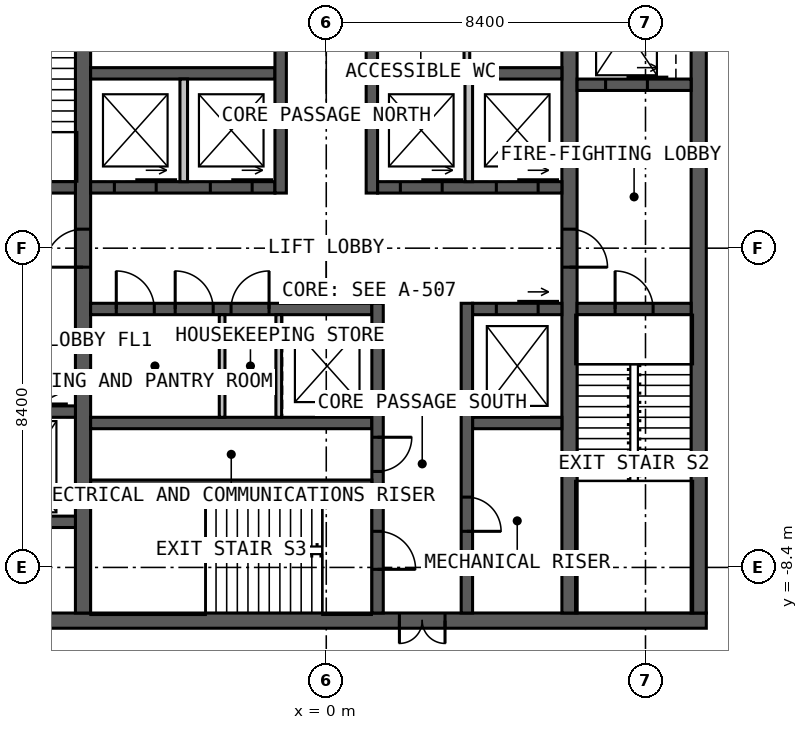
"""IFC4 building model, lengths in metres.
Left out: names, types, materials, properties, quantities, classifications, styles, units other than length and angle.
Written with IfcOpenShell. Run it as: python <this file> out.ifc"""

import sys

from ifc_helpers import new_model, si_unit, direction, frame, frame_2d, origin, place, context, subcontext, project, spatial, rectangle, extrude, element, fill, save


model = new_model("IFC4")
c1 = context("Model", 3, precision=1e-05, world=origin(), true_north=direction((0.0, 1.0)))
c2 = subcontext(c1, "Body", "Model", "MODEL_VIEW")
j1 = project(units=[si_unit("LENGTHUNIT", "METRE"), si_unit("PLANEANGLEUNIT", "RADIAN")], contexts=[c1])
p1 = place(None, origin())
s1 = spatial("IfcSite", under=j1, at=p1, CompositionType="ELEMENT")
p2 = place(p1, origin())
s2 = spatial("IfcBuilding", under=s1, at=p2, CompositionType="ELEMENT")
p3 = place(p2, frame((0.0, 0.0, 276.0)))
s3 = spatial("IfcBuildingStorey", under=s2, at=p3, CompositionType="ELEMENT", Elevation=276.0)
p4 = place(p3, frame((10.0, -9.8, 0.0), z_axis=(0.0, 0.0, 1.0), x_axis=(-1.0, 0.0, 0.0)))
e1 = element("IfcWall", 1, at=p4, inside=s3, PredefinedType="SOLIDWALL", context=c2, shape_type="SweptSolid", body=[
    extrude(rectangle(XDim=20.0, YDim=0.4, at=frame_2d((10.0, 0.0))), origin(), (0.0, 0.0, 1.0), 4.0),
])
p5 = place(p4, frame((6.875, 0.0, 0.0)))
e2 = element("IfcOpeningElement", 2, at=p5, cuts=e1, PredefinedType="OPENING", context=c2, shape_type="SweptSolid", body=[
    extrude(rectangle(XDim=1.2, YDim=2.2, at=frame_2d((0.6, 1.1))), frame((0.0, 0.21, 0.0), z_axis=(0.0, -1.0, 0.0), x_axis=(1.0, 0.0, 0.0)), (0.0, 0.0, 1.0), 0.42),
])
p6 = place(p3, frame((9.8, -9.6, 0.0), z_axis=(0.0, 0.0, 1.0), x_axis=(0.0, 1.0, 0.0)))
e3 = element("IfcWall", 3, at=p6, inside=s3, PredefinedType="SOLIDWALL", context=c2, shape_type="SweptSolid", body=[
    extrude(rectangle(XDim=19.2, YDim=0.4, at=frame_2d((9.6, 0.0))), origin(), (0.0, 0.0, 1.0), 4.0),
])
p7 = place(p3, frame((-6.4, -9.6, 0.0), z_axis=(0.0, 0.0, 1.0), x_axis=(0.0, 1.0, 0.0)))
e4 = element("IfcWall", 4, at=p7, inside=s3, PredefinedType="SOLIDWALL", context=c2, shape_type="SweptSolid", body=[
    extrude(rectangle(XDim=19.2, YDim=0.4, at=frame_2d((9.6, 0.0))), origin(), (0.0, 0.0, 1.0), 4.0),
])
p8 = place(p7, frame((9.1, 0.0, 0.0)))
e5 = element("IfcOpeningElement", 5, at=p8, cuts=e4, PredefinedType="OPENING", context=c2, shape_type="SweptSolid", body=[
    extrude(rectangle(XDim=1.0, YDim=2.2, at=frame_2d((0.5, 1.1))), frame((0.0, 0.21, 0.0), z_axis=(0.0, -1.0, 0.0), x_axis=(1.0, 0.0, 0.0)), (0.0, 0.0, 1.0), 0.42),
])
p9 = place(p3, frame((6.4, 9.6, 0.0), z_axis=(0.0, 0.0, 1.0), x_axis=(0.0, -1.0, 0.0)))
e6 = element("IfcWall", 6, at=p9, inside=s3, PredefinedType="SOLIDWALL", context=c2, shape_type="SweptSolid", body=[
    extrude(rectangle(XDim=19.2, YDim=0.4, at=frame_2d((9.6, 0.0))), origin(), (0.0, 0.0, 1.0), 4.0),
])
p10 = place(p9, frame((9.1, 0.0, 0.0)))
e7 = element("IfcOpeningElement", 7, at=p10, cuts=e6, PredefinedType="OPENING", context=c2, shape_type="SweptSolid", body=[
    extrude(rectangle(XDim=1.0, YDim=2.2, at=frame_2d((0.5, 1.1))), frame((0.0, 0.21, 0.0), z_axis=(0.0, -1.0, 0.0), x_axis=(1.0, 0.0, 0.0)), (0.0, 0.0, 1.0), 0.42),
])
p11 = place(p3, frame((-6.2, 1.6, 0.0), z_axis=(0.0, 0.0, 1.0), x_axis=(1.0, 0.0, 0.0)))
e8 = element("IfcWall", 8, at=p11, inside=s3, PredefinedType="SOLIDWALL", context=c2, shape_type="SweptSolid", body=[
    extrude(rectangle(XDim=4.85, YDim=0.3, at=frame_2d((2.425, 0.0))), origin(), (0.0, 0.0, 1.0), 4.0),
])
p12 = place(p11, frame((0.625, 0.0, 0.0)))
e9 = element("IfcOpeningElement", 9, at=p12, cuts=e8, PredefinedType="OPENING", context=c2, shape_type="SweptSolid", body=[
    extrude(rectangle(XDim=1.1, YDim=2.2, at=frame_2d((0.55, 1.1))), frame((0.0, 0.16, 0.0), z_axis=(0.0, -1.0, 0.0), x_axis=(1.0, 0.0, 0.0)), (0.0, 0.0, 1.0), 0.32),
])
p13 = place(p11, frame((3.15, 0.0, 0.0)))
e10 = element("IfcOpeningElement", 10, at=p13, cuts=e8, PredefinedType="OPENING", context=c2, shape_type="SweptSolid", body=[
    extrude(rectangle(XDim=1.1, YDim=2.2, at=frame_2d((0.55, 1.1))), frame((0.0, 0.16, 0.0), z_axis=(0.0, -1.0, 0.0), x_axis=(1.0, 0.0, 0.0)), (0.0, 0.0, 1.0), 0.32),
])
p14 = place(p3, frame((1.35, 1.6, 0.0), z_axis=(0.0, 0.0, 1.0), x_axis=(1.0, 0.0, 0.0)))
e11 = element("IfcWall", 11, at=p14, inside=s3, PredefinedType="SOLIDWALL", context=c2, shape_type="SweptSolid", body=[
    extrude(rectangle(XDim=4.85, YDim=0.3, at=frame_2d((2.425, 0.0))), origin(), (0.0, 0.0, 1.0), 4.0),
])
p15 = place(p14, frame((0.6, 0.0, 0.0)))
e12 = element("IfcOpeningElement", 12, at=p15, cuts=e11, PredefinedType="OPENING", context=c2, shape_type="SweptSolid", body=[
    extrude(rectangle(XDim=1.1, YDim=2.2, at=frame_2d((0.55, 1.1))), frame((0.0, 0.16, 0.0), z_axis=(0.0, -1.0, 0.0), x_axis=(1.0, 0.0, 0.0)), (0.0, 0.0, 1.0), 0.32),
])
p16 = place(p14, frame((3.125, 0.0, 0.0)))
e13 = element("IfcOpeningElement", 13, at=p16, cuts=e11, PredefinedType="OPENING", context=c2, shape_type="SweptSolid", body=[
    extrude(rectangle(XDim=1.1, YDim=2.2, at=frame_2d((0.55, 1.1))), frame((0.0, 0.16, 0.0), z_axis=(0.0, -1.0, 0.0), x_axis=(1.0, 0.0, 0.0)), (0.0, 0.0, 1.0), 0.32),
])
for number, where, z_axis, x_axis in (
    (14, (-6.2, 4.6, 0.0), (0.0, 0.0, 1.0), (1.0, 0.0, 0.0)),
    (15, (1.35, 4.6, 0.0), (0.0, 0.0, 1.0), (1.0, 0.0, 0.0)),
):
    element("IfcWall", number, at=place(p3, frame(where, z_axis=z_axis, x_axis=x_axis)), inside=s3, PredefinedType="SOLIDWALL", context=c2, shape_type="SweptSolid", body=[
        extrude(rectangle(XDim=4.85, YDim=0.3, at=frame_2d((2.425, 0.0))), origin(), (0.0, 0.0, 1.0), 4.0),
    ])
p17 = place(p3, frame((-1.2, 1.45, 0.0), z_axis=(0.0, 0.0, 1.0), x_axis=(0.0, 1.0, 0.0)))
e16 = element("IfcWall", 16, at=p17, inside=s3, PredefinedType="SOLIDWALL", context=c2, shape_type="SweptSolid", body=[
    extrude(rectangle(XDim=8.15, YDim=0.3, at=frame_2d((4.075, 0.0))), origin(), (0.0, 0.0, 1.0), 4.0),
])
p18 = place(p17, frame((5.05, 0.0, 0.0)))
e17 = element("IfcOpeningElement", 17, at=p18, cuts=e16, PredefinedType="OPENING", context=c2, shape_type="SweptSolid", body=[
    extrude(rectangle(XDim=1.0, YDim=2.2, at=frame_2d((0.5, 1.1))), frame((0.0, 0.16, 0.0), z_axis=(0.0, -1.0, 0.0), x_axis=(1.0, 0.0, 0.0)), (0.0, 0.0, 1.0), 0.32),
])
p19 = place(p3, frame((1.2, 1.45, 0.0), z_axis=(0.0, 0.0, 1.0), x_axis=(0.0, 1.0, 0.0)))
e18 = element("IfcWall", 18, at=p19, inside=s3, PredefinedType="SOLIDWALL", context=c2, shape_type="SweptSolid", body=[
    extrude(rectangle(XDim=8.15, YDim=0.3, at=frame_2d((4.075, 0.0))), origin(), (0.0, 0.0, 1.0), 4.0),
])
p20 = place(p19, frame((3.8, 0.0, 0.0)))
e19 = element("IfcOpeningElement", 19, at=p20, cuts=e18, PredefinedType="OPENING", context=c2, shape_type="SweptSolid", body=[
    extrude(rectangle(XDim=1.0, YDim=2.2, at=frame_2d((0.5, 1.1))), frame((0.0, 0.16, 0.0), z_axis=(0.0, -1.0, 0.0), x_axis=(1.0, 0.0, 0.0)), (0.0, 0.0, 1.0), 0.32),
])
p21 = place(p19, frame((6.15, 0.0, 0.0)))
e20 = element("IfcOpeningElement", 20, at=p21, cuts=e18, PredefinedType="OPENING", context=c2, shape_type="SweptSolid", body=[
    extrude(rectangle(XDim=1.0, YDim=2.2, at=frame_2d((0.5, 1.1))), frame((0.0, 0.16, 0.0), z_axis=(0.0, -1.0, 0.0), x_axis=(1.0, 0.0, 0.0)), (0.0, 0.0, 1.0), 0.32),
])
p22 = place(p3, frame((-6.2, -1.6, 0.0), z_axis=(0.0, 0.0, 1.0), x_axis=(1.0, 0.0, 0.0)))
e21 = element("IfcWall", 21, at=p22, inside=s3, PredefinedType="SOLIDWALL", context=c2, shape_type="SweptSolid", body=[
    extrude(rectangle(XDim=7.4, YDim=0.3, at=frame_2d((3.7, 0.0))), origin(), (0.0, 0.0, 1.0), 4.0),
])
p23 = place(p22, frame((0.675, 0.0, 0.0)))
e22 = element("IfcOpeningElement", 22, at=p23, cuts=e21, PredefinedType="OPENING", context=c2, shape_type="SweptSolid", body=[
    extrude(rectangle(XDim=1.0, YDim=2.2, at=frame_2d((0.5, 1.1))), frame((0.0, 0.16, 0.0), z_axis=(0.0, -1.0, 0.0), x_axis=(1.0, 0.0, 0.0)), (0.0, 0.0, 1.0), 0.32),
])
p24 = place(p22, frame((2.225, 0.0, 0.0)))
e23 = element("IfcOpeningElement", 23, at=p24, cuts=e21, PredefinedType="OPENING", context=c2, shape_type="SweptSolid", body=[
    extrude(rectangle(XDim=1.0, YDim=2.2, at=frame_2d((0.5, 1.1))), frame((0.0, 0.16, 0.0), z_axis=(0.0, -1.0, 0.0), x_axis=(1.0, 0.0, 0.0)), (0.0, 0.0, 1.0), 0.32),
])
p25 = place(p22, frame((3.695, 0.0, 0.0)))
e24 = element("IfcOpeningElement", 24, at=p25, cuts=e21, PredefinedType="OPENING", context=c2, shape_type="SweptSolid", body=[
    extrude(rectangle(XDim=1.0, YDim=2.2, at=frame_2d((0.5, 1.1))), frame((0.0, 0.16, 0.0), z_axis=(0.0, -1.0, 0.0), x_axis=(1.0, 0.0, 0.0)), (0.0, 0.0, 1.0), 0.32),
])
p26 = place(p3, frame((3.85, -1.6, 0.0), z_axis=(0.0, 0.0, 1.0), x_axis=(1.0, 0.0, 0.0)))
e25 = element("IfcWall", 25, at=p26, inside=s3, PredefinedType="SOLIDWALL", context=c2, shape_type="SweptSolid", body=[
    extrude(rectangle(XDim=2.35, YDim=0.3, at=frame_2d((1.175, 0.0))), origin(), (0.0, 0.0, 1.0), 4.0),
])
p27 = place(p26, frame((0.625, 0.0, 0.0)))
e26 = element("IfcOpeningElement", 26, at=p27, cuts=e25, PredefinedType="OPENING", context=c2, shape_type="SweptSolid", body=[
    extrude(rectangle(XDim=1.1, YDim=2.2, at=frame_2d((0.55, 1.1))), frame((0.0, 0.16, 0.0), z_axis=(0.0, -1.0, 0.0), x_axis=(1.0, 0.0, 0.0)), (0.0, 0.0, 1.0), 0.32),
])
p28 = place(p3, frame((-6.2, -4.6, 0.0), z_axis=(0.0, 0.0, 1.0), x_axis=(1.0, 0.0, 0.0)))
e27 = element("IfcWall", 27, at=p28, inside=s3, PredefinedType="SOLIDWALL", context=c2, shape_type="SweptSolid", body=[
    extrude(rectangle(XDim=7.4, YDim=0.3, at=frame_2d((3.7, 0.0))), origin(), (0.0, 0.0, 1.0), 4.0),
])
p29 = place(p3, frame((3.85, -4.6, 0.0), z_axis=(0.0, 0.0, 1.0), x_axis=(1.0, 0.0, 0.0)))
e28 = element("IfcWall", 28, at=p29, inside=s3, PredefinedType="SOLIDWALL", context=c2, shape_type="SweptSolid", body=[
    extrude(rectangle(XDim=2.35, YDim=0.3, at=frame_2d((1.175, 0.0))), origin(), (0.0, 0.0, 1.0), 4.0),
])
p30 = place(p3, frame((1.35, -1.45, 0.0), z_axis=(0.0, 0.0, 1.0), x_axis=(0.0, -1.0, 0.0)))
e29 = element("IfcWall", 29, at=p30, inside=s3, PredefinedType="SOLIDWALL", context=c2, shape_type="SweptSolid", body=[
    extrude(rectangle(XDim=8.15, YDim=0.3, at=frame_2d((4.075, 0.0))), origin(), (0.0, 0.0, 1.0), 4.0),
])
p31 = place(p30, frame((6.0, 0.0, 0.0)))
e30 = element("IfcOpeningElement", 30, at=p31, cuts=e29, PredefinedType="OPENING", context=c2, shape_type="SweptSolid", body=[
    extrude(rectangle(XDim=1.0, YDim=2.2, at=frame_2d((0.5, 1.1))), frame((0.0, 0.16, 0.0), z_axis=(0.0, -1.0, 0.0), x_axis=(1.0, 0.0, 0.0)), (0.0, 0.0, 1.0), 0.32),
])
p32 = place(p30, frame((3.525, 0.0, 0.0)))
e31 = element("IfcOpeningElement", 31, at=p32, cuts=e29, PredefinedType="OPENING", context=c2, shape_type="SweptSolid", body=[
    extrude(rectangle(XDim=0.9, YDim=2.2, at=frame_2d((0.45, 1.1))), frame((0.0, 0.16, 0.0), z_axis=(0.0, -1.0, 0.0), x_axis=(1.0, 0.0, 0.0)), (0.0, 0.0, 1.0), 0.32),
])
p33 = place(p3, frame((3.7, -1.45, 0.0), z_axis=(0.0, 0.0, 1.0), x_axis=(0.0, -1.0, 0.0)))
e32 = element("IfcWall", 32, at=p33, inside=s3, PredefinedType="SOLIDWALL", context=c2, shape_type="SweptSolid", body=[
    extrude(rectangle(XDim=8.15, YDim=0.3, at=frame_2d((4.075, 0.0))), origin(), (0.0, 0.0, 1.0), 4.0),
])
p34 = place(p33, frame((5.1, 0.0, 0.0)))
e33 = element("IfcOpeningElement", 33, at=p34, cuts=e32, PredefinedType="OPENING", context=c2, shape_type="SweptSolid", body=[
    extrude(rectangle(XDim=0.9, YDim=2.2, at=frame_2d((0.45, 1.1))), frame((0.0, 0.16, 0.0), z_axis=(0.0, -1.0, 0.0), x_axis=(1.0, 0.0, 0.0)), (0.0, 0.0, 1.0), 0.32),
])
p35 = place(p3, frame((-6.2, -6.2, 0.0), z_axis=(0.0, 0.0, 1.0), x_axis=(1.0, 0.0, 0.0)))
e34 = element("IfcWall", 34, at=p35, inside=s3, PredefinedType="SOLIDWALL", context=c2, shape_type="SweptSolid", body=[
    extrude(rectangle(XDim=7.4, YDim=0.2, at=frame_2d((3.7, 0.0))), origin(), (0.0, 0.0, 1.0), 4.0),
])
p36 = place(p3, frame((-9.6, 1.6, 0.0), z_axis=(0.0, 0.0, 1.0), x_axis=(1.0, 0.0, 0.0)))
e35 = element("IfcWall", 35, at=p36, inside=s3, PredefinedType="SOLIDWALL", context=c2, shape_type="SweptSolid", body=[
    extrude(rectangle(XDim=3.0, YDim=0.3, at=frame_2d((1.5, 0.0))), origin(), (0.0, 0.0, 1.0), 4.0),
])
p37 = place(p36, frame((1.0, 0.0, 0.0)))
e36 = element("IfcOpeningElement", 36, at=p37, cuts=e35, PredefinedType="OPENING", context=c2, shape_type="SweptSolid", body=[
    extrude(rectangle(XDim=1.0, YDim=2.2, at=frame_2d((0.5, 1.1))), frame((0.0, 0.16, 0.0), z_axis=(0.0, -1.0, 0.0), x_axis=(1.0, 0.0, 0.0)), (0.0, 0.0, 1.0), 0.32),
])
p38 = place(p3, frame((6.6, -1.6, 0.0), z_axis=(0.0, 0.0, 1.0), x_axis=(1.0, 0.0, 0.0)))
e37 = element("IfcWall", 37, at=p38, inside=s3, PredefinedType="SOLIDWALL", context=c2, shape_type="SweptSolid", body=[
    extrude(rectangle(XDim=3.0, YDim=0.3, at=frame_2d((1.5, 0.0))), origin(), (0.0, 0.0, 1.0), 4.0),
])
p39 = place(p38, frame((1.0, 0.0, 0.0)))
e38 = element("IfcOpeningElement", 38, at=p39, cuts=e37, PredefinedType="OPENING", context=c2, shape_type="SweptSolid", body=[
    extrude(rectangle(XDim=1.0, YDim=2.2, at=frame_2d((0.5, 1.1))), frame((0.0, 0.16, 0.0), z_axis=(0.0, -1.0, 0.0), x_axis=(1.0, 0.0, 0.0)), (0.0, 0.0, 1.0), 0.32),
])
p40 = place(p3, frame((-9.6, -4.3, 0.0), z_axis=(0.0, 0.0, 1.0), x_axis=(1.0, 0.0, 0.0)))
e39 = element("IfcWall", 39, at=p40, inside=s3, PredefinedType="SOLIDWALL", context=c2, shape_type="SweptSolid", body=[
    extrude(rectangle(XDim=3.0, YDim=0.3, at=frame_2d((1.5, 0.0))), origin(), (0.0, 0.0, 1.0), 4.0),
])
p41 = place(p40, frame((1.15, 0.0, 0.0)))
e40 = element("IfcOpeningElement", 40, at=p41, cuts=e39, PredefinedType="OPENING", context=c2, shape_type="SweptSolid", body=[
    extrude(rectangle(XDim=1.1, YDim=2.2, at=frame_2d((0.55, 1.1))), frame((0.0, 0.16, 0.0), z_axis=(0.0, -1.0, 0.0), x_axis=(1.0, 0.0, 0.0)), (0.0, 0.0, 1.0), 0.32),
])
p42 = place(p3, frame((6.6, 4.3, 0.0), z_axis=(0.0, 0.0, 1.0), x_axis=(1.0, 0.0, 0.0)))
e41 = element("IfcWall", 41, at=p42, inside=s3, PredefinedType="SOLIDWALL", context=c2, shape_type="SweptSolid", body=[
    extrude(rectangle(XDim=3.0, YDim=0.3, at=frame_2d((1.5, 0.0))), origin(), (0.0, 0.0, 1.0), 4.0),
])
p43 = place(p42, frame((0.75, 0.0, 0.0)))
e42 = element("IfcOpeningElement", 42, at=p43, cuts=e41, PredefinedType="OPENING", context=c2, shape_type="SweptSolid", body=[
    extrude(rectangle(XDim=1.1, YDim=2.2, at=frame_2d((0.55, 1.1))), frame((0.0, 0.16, 0.0), z_axis=(0.0, -1.0, 0.0), x_axis=(1.0, 0.0, 0.0)), (0.0, 0.0, 1.0), 0.32),
])
p44 = place(p3, frame((-9.6, -7.2, 0.0), z_axis=(0.0, 0.0, 1.0), x_axis=(1.0, 0.0, 0.0)))
e43 = element("IfcWall", 43, at=p44, inside=s3, PredefinedType="SOLIDWALL", context=c2, shape_type="SweptSolid", body=[
    extrude(rectangle(XDim=3.0, YDim=0.3, at=frame_2d((1.5, 0.0))), origin(), (0.0, 0.0, 1.0), 4.0),
])
for number, where, z_axis, x_axis in (
    (44, (-3.75, 1.75, 0.0), (0.0, 0.0, 1.0), (0.0, 1.0, 0.0)),
    (45, (3.75, 1.75, 0.0), (0.0, 0.0, 1.0), (0.0, 1.0, 0.0)),
):
    element("IfcWall", number, at=place(p3, frame(where, z_axis=z_axis, x_axis=x_axis)), inside=s3, PredefinedType="SOLIDWALL", context=c2, shape_type="SweptSolid", body=[
        extrude(rectangle(XDim=2.7, YDim=0.2, at=frame_2d((1.35, 0.0))), origin(), (0.0, 0.0, 1.0), 3.75),
    ])
p45 = place(p3, frame((3.7, 4.75, 0.0), z_axis=(0.0, 0.0, 1.0), x_axis=(0.0, 1.0, 0.0)))
e46 = element("IfcWall", 46, at=p45, inside=s3, PredefinedType="PARTITIONING", context=c2, shape_type="SweptSolid", body=[
    extrude(rectangle(XDim=1.975, YDim=0.15, at=frame_2d((0.988, 0.0))), origin(), (0.0, 0.0, 1.0), 3.75),
])
for number, where, z_axis, x_axis in (
    (47, (-2.74, -1.75, 0.0), (0.0, 0.0, 1.0), (0.0, -1.0, 0.0)),
    (48, (-1.25, -1.75, 0.0), (0.0, 0.0, 1.0), (0.0, -1.0, 0.0)),
):
    element("IfcWall", number, at=place(p3, frame(where, z_axis=z_axis, x_axis=x_axis)), inside=s3, PredefinedType="PARTITIONING", context=c2, shape_type="SweptSolid", body=[
        extrude(rectangle(XDim=2.7, YDim=0.15, at=frame_2d((1.35, 0.0))), origin(), (0.0, 0.0, 1.0), 3.75),
    ])
p46 = place(p5, origin())
e49 = element("IfcDoor", 49, at=p46, inside=s3, OperationType="DOUBLE_DOOR_SINGLE_SWING", PredefinedType="DOOR", context=c2, shape_type="SweptSolid", body=[
    extrude(rectangle(XDim=1.2, YDim=2.2, at=frame_2d((0.6, 1.1))), frame((0.0, 0.025, 0.0), z_axis=(0.0, -1.0, 0.0), x_axis=(1.0, 0.0, 0.0)), (0.0, 0.0, 1.0), 0.05),
])
fill(e2, e49)
p47 = place(p8, origin())
e50 = element("IfcDoor", 50, at=p47, inside=s3, OperationType="SINGLE_SWING_LEFT", PredefinedType="DOOR", context=c2, shape_type="SweptSolid", body=[
    extrude(rectangle(XDim=1.0, YDim=2.2, at=frame_2d((0.5, 1.1))), frame((0.0, 0.025, 0.0), z_axis=(0.0, -1.0, 0.0), x_axis=(1.0, 0.0, 0.0)), (0.0, 0.0, 1.0), 0.05),
])
fill(e5, e50)
p48 = place(p10, origin())
e51 = element("IfcDoor", 51, at=p48, inside=s3, OperationType="SINGLE_SWING_RIGHT", PredefinedType="DOOR", context=c2, shape_type="SweptSolid", body=[
    extrude(rectangle(XDim=1.0, YDim=2.2, at=frame_2d((0.5, 1.1))), frame((0.0, 0.025, 0.0), z_axis=(0.0, -1.0, 0.0), x_axis=(1.0, 0.0, 0.0)), (0.0, 0.0, 1.0), 0.05),
])
fill(e7, e51)
p49 = place(p39, origin())
e52 = element("IfcDoor", 52, at=p49, inside=s3, OperationType="SINGLE_SWING_LEFT", PredefinedType="DOOR", context=c2, shape_type="SweptSolid", body=[
    extrude(rectangle(XDim=1.0, YDim=2.2, at=frame_2d((0.5, 1.1))), frame((0.0, 0.025, 0.0), z_axis=(0.0, -1.0, 0.0), x_axis=(1.0, 0.0, 0.0)), (0.0, 0.0, 1.0), 0.05),
])
fill(e38, e52)
p50 = place(p31, origin())
e53 = element("IfcDoor", 53, at=p50, inside=s3, OperationType="SINGLE_SWING_RIGHT", PredefinedType="DOOR", context=c2, shape_type="SweptSolid", body=[
    extrude(rectangle(XDim=1.0, YDim=2.2, at=frame_2d((0.5, 1.1))), frame((0.0, 0.025, 0.0), z_axis=(0.0, -1.0, 0.0), x_axis=(1.0, 0.0, 0.0)), (0.0, 0.0, 1.0), 0.05),
])
fill(e30, e53)
p51 = place(p32, origin())
e54 = element("IfcDoor", 54, at=p51, inside=s3, OperationType="SINGLE_SWING_LEFT", PredefinedType="DOOR", context=c2, shape_type="SweptSolid", body=[
    extrude(rectangle(XDim=0.9, YDim=2.2, at=frame_2d((0.45, 1.1))), frame((0.0, 0.025, 0.0), z_axis=(0.0, -1.0, 0.0), x_axis=(1.0, 0.0, 0.0)), (0.0, 0.0, 1.0), 0.05),
])
fill(e31, e54)
p52 = place(p34, origin())
e55 = element("IfcDoor", 55, at=p52, inside=s3, OperationType="SINGLE_SWING_RIGHT", PredefinedType="DOOR", context=c2, shape_type="SweptSolid", body=[
    extrude(rectangle(XDim=0.9, YDim=2.2, at=frame_2d((0.45, 1.1))), frame((0.0, 0.025, 0.0), z_axis=(0.0, -1.0, 0.0), x_axis=(1.0, 0.0, 0.0)), (0.0, 0.0, 1.0), 0.05),
])
fill(e33, e55)
p53 = place(p23, origin())
e56 = element("IfcDoor", 56, at=p53, inside=s3, OperationType="SINGLE_SWING_LEFT", PredefinedType="DOOR", context=c2, shape_type="SweptSolid", body=[
    extrude(rectangle(XDim=1.0, YDim=2.2, at=frame_2d((0.5, 1.1))), frame((0.0, 0.025, 0.0), z_axis=(0.0, -1.0, 0.0), x_axis=(1.0, 0.0, 0.0)), (0.0, 0.0, 1.0), 0.05),
])
fill(e22, e56)
p54 = place(p24, origin())
e57 = element("IfcDoor", 57, at=p54, inside=s3, OperationType="SINGLE_SWING_LEFT", PredefinedType="DOOR", context=c2, shape_type="SweptSolid", body=[
    extrude(rectangle(XDim=1.0, YDim=2.2, at=frame_2d((0.5, 1.1))), frame((0.0, 0.025, 0.0), z_axis=(0.0, -1.0, 0.0), x_axis=(1.0, 0.0, 0.0)), (0.0, 0.0, 1.0), 0.05),
])
fill(e23, e57)
p55 = place(p25, origin())
e58 = element("IfcDoor", 58, at=p55, inside=s3, OperationType="SINGLE_SWING_RIGHT", PredefinedType="DOOR", context=c2, shape_type="SweptSolid", body=[
    extrude(rectangle(XDim=1.0, YDim=2.2, at=frame_2d((0.5, 1.1))), frame((0.0, 0.025, 0.0), z_axis=(0.0, -1.0, 0.0), x_axis=(1.0, 0.0, 0.0)), (0.0, 0.0, 1.0), 0.05),
])
fill(e24, e58)
p56 = place(p12, origin())
e59 = element("IfcDoor", 59, at=p56, inside=s3, OperationType="SLIDING_TO_LEFT", PredefinedType="DOOR", context=c2, shape_type="SweptSolid", body=[
    extrude(rectangle(XDim=1.1, YDim=2.2, at=frame_2d((0.55, 1.1))), frame((0.0, 0.025, 0.0), z_axis=(0.0, -1.0, 0.0), x_axis=(1.0, 0.0, 0.0)), (0.0, 0.0, 1.0), 0.05),
])
fill(e9, e59)
p57 = place(p13, origin())
e60 = element("IfcDoor", 60, at=p57, inside=s3, OperationType="SLIDING_TO_LEFT", PredefinedType="DOOR", context=c2, shape_type="SweptSolid", body=[
    extrude(rectangle(XDim=1.1, YDim=2.2, at=frame_2d((0.55, 1.1))), frame((0.0, 0.025, 0.0), z_axis=(0.0, -1.0, 0.0), x_axis=(1.0, 0.0, 0.0)), (0.0, 0.0, 1.0), 0.05),
])
fill(e10, e60)
p58 = place(p15, origin())
e61 = element("IfcDoor", 61, at=p58, inside=s3, OperationType="SLIDING_TO_LEFT", PredefinedType="DOOR", context=c2, shape_type="SweptSolid", body=[
    extrude(rectangle(XDim=1.1, YDim=2.2, at=frame_2d((0.55, 1.1))), frame((0.0, 0.025, 0.0), z_axis=(0.0, -1.0, 0.0), x_axis=(1.0, 0.0, 0.0)), (0.0, 0.0, 1.0), 0.05),
])
fill(e12, e61)
p59 = place(p16, origin())
e62 = element("IfcDoor", 62, at=p59, inside=s3, OperationType="SLIDING_TO_LEFT", PredefinedType="DOOR", context=c2, shape_type="SweptSolid", body=[
    extrude(rectangle(XDim=1.1, YDim=2.2, at=frame_2d((0.55, 1.1))), frame((0.0, 0.025, 0.0), z_axis=(0.0, -1.0, 0.0), x_axis=(1.0, 0.0, 0.0)), (0.0, 0.0, 1.0), 0.05),
])
fill(e13, e62)
p60 = place(p27, origin())
e63 = element("IfcDoor", 63, at=p60, inside=s3, OperationType="SLIDING_TO_LEFT", PredefinedType="DOOR", context=c2, shape_type="SweptSolid", body=[
    extrude(rectangle(XDim=1.1, YDim=2.2, at=frame_2d((0.55, 1.1))), frame((0.0, 0.025, 0.0), z_axis=(0.0, -1.0, 0.0), x_axis=(1.0, 0.0, 0.0)), (0.0, 0.0, 1.0), 0.05),
])
fill(e26, e63)
p61 = place(p43, origin())
e64 = element("IfcDoor", 64, at=p61, inside=s3, OperationType="SLIDING_TO_LEFT", PredefinedType="DOOR", context=c2, shape_type="SweptSolid", body=[
    extrude(rectangle(XDim=1.1, YDim=2.2, at=frame_2d((0.55, 1.1))), frame((0.0, 0.025, 0.0), z_axis=(0.0, -1.0, 0.0), x_axis=(1.0, 0.0, 0.0)), (0.0, 0.0, 1.0), 0.05),
])
fill(e42, e64)
save(model, sys.argv[1])
